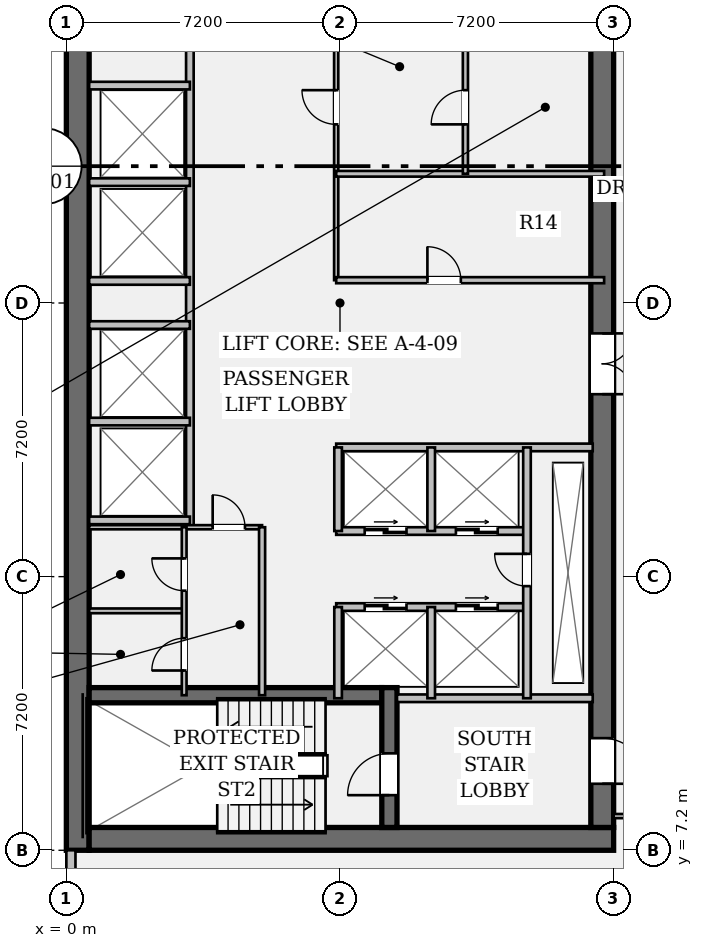
"""IFC4 building model, lengths in metres.
Left out: names, types, materials, properties, quantities, classifications, styles, units other than length and angle.
Written with IfcOpenShell. Run it as: python <this file> out.ifc"""

import sys

from ifc_helpers import new_model, si_unit, direction, frame, frame_2d, origin, place, context, subcontext, project, spatial, rectangle, extrude, element, fill, save


model = new_model("IFC4")
c1 = context("Model", 3, precision=1e-05, world=origin(), true_north=direction((0.0, 1.0)))
c2 = subcontext(c1, "Body", "Model", "MODEL_VIEW")
j1 = project(units=[si_unit("LENGTHUNIT", "METRE"), si_unit("PLANEANGLEUNIT", "RADIAN")], contexts=[c1])
p1 = place(None, origin())
s1 = spatial("IfcSite", under=j1, at=p1, CompositionType="ELEMENT")
p2 = place(p1, origin())
s2 = spatial("IfcBuilding", under=s1, at=p2, CompositionType="ELEMENT")
p3 = place(p2, frame((0.0, 0.0, 136.85)))
s3 = spatial("IfcBuildingStorey", under=s2, at=p3, CompositionType="ELEMENT", Elevation=136.85)
p4 = place(p3, frame((0.3, 7.2, 0.0), z_axis=(0.0, 0.0, 1.0), x_axis=(0.0, 1.0, 0.0)))
e1 = element("IfcWall", 1, at=p4, inside=s3, PredefinedType="SHEAR", context=c2, shape_type="SweptSolid", body=[
    extrude(rectangle(XDim=28.8, YDim=0.6, at=frame_2d((14.4, 0.0))), origin(), (0.0, 0.0, 1.0), 3.58),
])
p5 = place(p3, frame((0.6, 7.5, 0.0), z_axis=(0.0, 0.0, 1.0), x_axis=(1.0, 0.0, 0.0)))
e2 = element("IfcWall", 2, at=p5, inside=s3, PredefinedType="SHEAR", context=c2, shape_type="SweptSolid", body=[
    extrude(rectangle(XDim=13.8, YDim=0.6, at=frame_2d((6.9, 0.0))), origin(), (0.0, 0.0, 1.0), 3.58),
])
p6 = place(p3, frame((14.1, 35.4, 0.0), z_axis=(0.0, 0.0, 1.0), x_axis=(0.0, -1.0, 0.0)))
e3 = element("IfcWall", 3, at=p6, inside=s3, PredefinedType="SHEAR", context=c2, shape_type="SweptSolid", body=[
    extrude(rectangle(XDim=27.6, YDim=0.6, at=frame_2d((13.8, 0.0))), origin(), (0.0, 0.0, 1.0), 3.58),
])
p7 = place(p6, frame((1.3, 0.0, 0.0)))
e4 = element("IfcOpeningElement", 4, at=p7, cuts=e3, PredefinedType="OPENING", context=c2, shape_type="SweptSolid", body=[
    extrude(rectangle(XDim=1.2, YDim=2.15, at=frame_2d((0.6, 1.075))), frame((0.0, 0.312, 0.0), z_axis=(0.0, -1.0, 0.0), x_axis=(1.0, 0.0, 0.0)), (0.0, 0.0, 1.0), 0.624),
])
p8 = place(p6, frame((25.25, 0.0, 0.0)))
e5 = element("IfcOpeningElement", 5, at=p8, cuts=e3, PredefinedType="OPENING", context=c2, shape_type="SweptSolid", body=[
    extrude(rectangle(XDim=1.2, YDim=2.15, at=frame_2d((0.6, 1.075))), frame((0.0, 0.312, 0.0), z_axis=(0.0, -1.0, 0.0), x_axis=(1.0, 0.0, 0.0)), (0.0, 0.0, 1.0), 0.624),
])
p9 = place(p6, frame((14.6, 0.0, 0.0)))
e6 = element("IfcOpeningElement", 6, at=p9, cuts=e3, PredefinedType="OPENING", context=c2, shape_type="SweptSolid", body=[
    extrude(rectangle(XDim=1.6, YDim=2.2, at=frame_2d((0.8, 1.1))), frame((0.0, 0.312, 0.0), z_axis=(0.0, -1.0, 0.0), x_axis=(1.0, 0.0, 0.0)), (0.0, 0.0, 1.0), 0.624),
])
p10 = place(p3, frame((0.6, 11.28, 0.0), z_axis=(0.0, 0.0, 1.0), x_axis=(1.0, 0.0, 0.0)))
e7 = element("IfcWall", 7, at=p10, inside=s3, PredefinedType="SHEAR", context=c2, shape_type="SweptSolid", body=[
    extrude(rectangle(XDim=7.7, YDim=0.4, at=frame_2d((3.85, 0.0))), origin(), (0.0, 0.0, 1.0), 3.58),
])
p11 = place(p3, frame((8.5, 7.8, 0.0), z_axis=(0.0, 0.0, 1.0), x_axis=(0.0, 1.0, 0.0)))
e8 = element("IfcWall", 8, at=p11, inside=s3, PredefinedType="SHEAR", context=c2, shape_type="SweptSolid", body=[
    extrude(rectangle(XDim=3.68, YDim=0.4, at=frame_2d((1.84, 0.0))), origin(), (0.0, 0.0, 1.0), 3.58),
])
p12 = place(p11, frame((0.85, 0.0, 0.0)))
e9 = element("IfcOpeningElement", 9, at=p12, cuts=e8, PredefinedType="OPENING", context=c2, shape_type="SweptSolid", body=[
    extrude(rectangle(XDim=1.1, YDim=2.15, at=frame_2d((0.55, 1.075))), frame((0.0, 0.212, 0.0), z_axis=(0.0, -1.0, 0.0), x_axis=(1.0, 0.0, 0.0)), (0.0, 0.0, 1.0), 0.424),
])
p13 = place(p3, frame((0.12, 5.87, 0.0), z_axis=(0.0, 0.0, 1.0), x_axis=(0.0, 1.0, 0.0)))
e10 = element("IfcWall", 10, at=p13, inside=s3, PredefinedType="STANDARD", context=c2, shape_type="SweptSolid", body=[
    extrude(rectangle(XDim=1.33, YDim=0.24, at=frame_2d((0.665, 0.0))), origin(), (0.0, 0.0, 1.0), 3.58),
])
p14 = place(p3, frame((8.7, 11.2, 0.0), z_axis=(0.0, 0.0, 1.0), x_axis=(1.0, 0.0, 0.0)))
e11 = element("IfcWall", 11, at=p14, inside=s3, PredefinedType="PARTITIONING", context=c2, shape_type="SweptSolid", body=[
    extrude(rectangle(XDim=5.15, YDim=0.2, at=frame_2d((2.575, 0.0))), origin(), (0.0, 0.0, 1.0), 3.58),
])
p15 = place(p3, frame((3.25, 15.7, 0.0), z_axis=(0.0, 0.0, 1.0), x_axis=(0.0, 1.0, 0.0)))
e12 = element("IfcWall", 12, at=p15, inside=s3, PredefinedType="PARTITIONING", context=c2, shape_type="SweptSolid", body=[
    extrude(rectangle(XDim=13.08, YDim=0.2, at=frame_2d((6.54, 0.0))), origin(), (0.0, 0.0, 1.0), 3.58),
])
for number, where, z_axis, x_axis in (
    (13, (0.6, 15.88, 0.0), (0.0, 0.0, 1.0), (1.0, 0.0, 0.0)),
    (14, (0.6, 18.48, 0.0), (0.0, 0.0, 1.0), (1.0, 0.0, 0.0)),
    (15, (0.6, 22.18, 0.0), (0.0, 0.0, 1.0), (1.0, 0.0, 0.0)),
    (16, (0.6, 24.78, 0.0), (0.0, 0.0, 1.0), (1.0, 0.0, 0.0)),
    (17, (0.6, 21.02, 0.0), (0.0, 0.0, 1.0), (1.0, 0.0, 0.0)),
    (18, (0.6, 27.32, 0.0), (0.0, 0.0, 1.0), (1.0, 0.0, 0.0)),
):
    element("IfcWall", number, at=place(p3, frame(where, z_axis=z_axis, x_axis=x_axis)), inside=s3, PredefinedType="PARTITIONING", context=c2, shape_type="SweptSolid", body=[
        extrude(rectangle(XDim=2.65, YDim=0.2, at=frame_2d((1.325, 0.0))), origin(), (0.0, 0.0, 1.0), 3.58),
    ])
p16 = place(p3, frame((7.1, 22.2, 0.0), z_axis=(0.0, 0.0, 1.0), x_axis=(0.0, 1.0, 0.0)))
e19 = element("IfcWall", 19, at=p16, inside=s3, PredefinedType="PARTITIONING", context=c2, shape_type="SweptSolid", body=[
    extrude(rectangle(XDim=6.58, YDim=0.11, at=frame_2d((3.29, 0.0))), origin(), (0.0, 0.0, 1.0), 3.58),
])
p17 = place(p16, frame((4.1, 0.0, 0.0)))
e20 = element("IfcOpeningElement", 20, at=p17, cuts=e19, PredefinedType="OPENING", context=c2, shape_type="SweptSolid", body=[
    extrude(rectangle(XDim=0.9, YDim=2.15, at=frame_2d((0.45, 1.075))), frame((0.0, 0.067, 0.0), z_axis=(0.0, -1.0, 0.0), x_axis=(1.0, 0.0, 0.0)), (0.0, 0.0, 1.0), 0.134),
])
p18 = place(p3, frame((7.1, 22.2, 0.0), z_axis=(0.0, 0.0, 1.0), x_axis=(1.0, 0.0, 0.0)))
e21 = element("IfcWall", 21, at=p18, inside=s3, PredefinedType="PARTITIONING", context=c2, shape_type="SweptSolid", body=[
    extrude(rectangle(XDim=7.05, YDim=0.16, at=frame_2d((3.525, 0.0))), origin(), (0.0, 0.0, 1.0), 3.58),
])
p19 = place(p18, frame((2.4, 0.0, 0.0)))
e22 = element("IfcOpeningElement", 22, at=p19, cuts=e21, PredefinedType="OPENING", context=c2, shape_type="SweptSolid", body=[
    extrude(rectangle(XDim=0.88, YDim=2.15, at=frame_2d((0.44, 1.075))), frame((0.0, 0.092, 0.0), z_axis=(0.0, -1.0, 0.0), x_axis=(1.0, 0.0, 0.0)), (0.0, 0.0, 1.0), 0.184),
])
p20 = place(p3, frame((7.1, 25.0, 0.0), z_axis=(0.0, 0.0, 1.0), x_axis=(1.0, 0.0, 0.0)))
e23 = element("IfcWall", 23, at=p20, inside=s3, PredefinedType="PARTITIONING", context=c2, shape_type="SweptSolid", body=[
    extrude(rectangle(XDim=7.05, YDim=0.15, at=frame_2d((3.525, 0.0))), origin(), (0.0, 0.0, 1.0), 3.58),
])
p21 = place(p3, frame((10.5, 25.0, 0.0), z_axis=(0.0, 0.0, 1.0), x_axis=(0.0, 1.0, 0.0)))
e24 = element("IfcWall", 24, at=p21, inside=s3, PredefinedType="PARTITIONING", context=c2, shape_type="SweptSolid", body=[
    extrude(rectangle(XDim=3.78, YDim=0.135, at=frame_2d((1.89, 0.0))), origin(), (0.0, 0.0, 1.0), 3.58),
])
p22 = place(p21, frame((1.3, 0.0, 0.0)))
e25 = element("IfcOpeningElement", 25, at=p22, cuts=e24, PredefinedType="OPENING", context=c2, shape_type="SweptSolid", body=[
    extrude(rectangle(XDim=0.9, YDim=2.15, at=frame_2d((0.45, 1.075))), frame((0.0, 0.08, 0.0), z_axis=(0.0, -1.0, 0.0), x_axis=(1.0, 0.0, 0.0)), (0.0, 0.0, 1.0), 0.159),
])
p23 = place(p3, frame((7.1, 17.8, 0.0), z_axis=(0.0, 0.0, 1.0), x_axis=(1.0, 0.0, 0.0)))
e26 = element("IfcWall", 26, at=p23, inside=s3, PredefinedType="PARTITIONING", context=c2, shape_type="SweptSolid", body=[
    extrude(rectangle(XDim=6.75, YDim=0.2, at=frame_2d((3.375, 0.0))), origin(), (0.0, 0.0, 1.0), 3.58),
])
p24 = place(p3, frame((7.1, 15.6, 0.0), z_axis=(0.0, 0.0, 1.0), x_axis=(1.0, 0.0, 0.0)))
e27 = element("IfcWall", 27, at=p24, inside=s3, PredefinedType="PARTITIONING", context=c2, shape_type="SweptSolid", body=[
    extrude(rectangle(XDim=5.02, YDim=0.2, at=frame_2d((2.51, 0.0))), origin(), (0.0, 0.0, 1.0), 3.58),
])
p25 = place(p24, frame((0.75, 0.0, 0.0)))
e28 = element("IfcOpeningElement", 28, at=p25, cuts=e27, PredefinedType="OPENING", context=c2, shape_type="SweptSolid", body=[
    extrude(rectangle(XDim=1.1, YDim=2.2, at=frame_2d((0.55, 1.1))), frame((0.0, 0.112, 0.0), z_axis=(0.0, -1.0, 0.0), x_axis=(1.0, 0.0, 0.0)), (0.0, 0.0, 1.0), 0.224),
])
p26 = place(p24, frame((3.15, 0.0, 0.0)))
e29 = element("IfcOpeningElement", 29, at=p26, cuts=e27, PredefinedType="OPENING", context=c2, shape_type="SweptSolid", body=[
    extrude(rectangle(XDim=1.1, YDim=2.2, at=frame_2d((0.55, 1.1))), frame((0.0, 0.112, 0.0), z_axis=(0.0, -1.0, 0.0), x_axis=(1.0, 0.0, 0.0)), (0.0, 0.0, 1.0), 0.224),
])
p27 = place(p3, frame((7.1, 13.6, 0.0), z_axis=(0.0, 0.0, 1.0), x_axis=(1.0, 0.0, 0.0)))
e30 = element("IfcWall", 30, at=p27, inside=s3, PredefinedType="PARTITIONING", context=c2, shape_type="SweptSolid", body=[
    extrude(rectangle(XDim=5.02, YDim=0.2, at=frame_2d((2.51, 0.0))), origin(), (0.0, 0.0, 1.0), 3.58),
])
p28 = place(p27, frame((0.75, 0.0, 0.0)))
e31 = element("IfcOpeningElement", 31, at=p28, cuts=e30, PredefinedType="OPENING", context=c2, shape_type="SweptSolid", body=[
    extrude(rectangle(XDim=1.1, YDim=2.2, at=frame_2d((0.55, 1.1))), frame((0.0, 0.112, 0.0), z_axis=(0.0, -1.0, 0.0), x_axis=(1.0, 0.0, 0.0)), (0.0, 0.0, 1.0), 0.224),
])
p29 = place(p27, frame((3.15, 0.0, 0.0)))
e32 = element("IfcOpeningElement", 32, at=p29, cuts=e30, PredefinedType="OPENING", context=c2, shape_type="SweptSolid", body=[
    extrude(rectangle(XDim=1.1, YDim=2.2, at=frame_2d((0.55, 1.1))), frame((0.0, 0.112, 0.0), z_axis=(0.0, -1.0, 0.0), x_axis=(1.0, 0.0, 0.0)), (0.0, 0.0, 1.0), 0.224),
])
p30 = place(p3, frame((7.15, 15.6, 0.0), z_axis=(0.0, 0.0, 1.0), x_axis=(0.0, 1.0, 0.0)))
e33 = element("IfcWall", 33, at=p30, inside=s3, PredefinedType="PARTITIONING", context=c2, shape_type="SweptSolid", body=[
    extrude(rectangle(XDim=2.2, YDim=0.2, at=frame_2d((1.1, 0.0))), origin(), (0.0, 0.0, 1.0), 3.58),
])
p31 = place(p3, frame((7.15, 11.2, 0.0), z_axis=(0.0, 0.0, 1.0), x_axis=(0.0, 1.0, 0.0)))
e34 = element("IfcWall", 34, at=p31, inside=s3, PredefinedType="PARTITIONING", context=c2, shape_type="SweptSolid", body=[
    extrude(rectangle(XDim=2.4, YDim=0.2, at=frame_2d((1.2, 0.0))), origin(), (0.0, 0.0, 1.0), 3.58),
])
p32 = place(p3, frame((9.6, 15.6, 0.0), z_axis=(0.0, 0.0, 1.0), x_axis=(0.0, 1.0, 0.0)))
e35 = element("IfcWall", 35, at=p32, inside=s3, PredefinedType="PARTITIONING", context=c2, shape_type="SweptSolid", body=[
    extrude(rectangle(XDim=2.2, YDim=0.2, at=frame_2d((1.1, 0.0))), origin(), (0.0, 0.0, 1.0), 3.58),
])
p33 = place(p3, frame((9.6, 11.2, 0.0), z_axis=(0.0, 0.0, 1.0), x_axis=(0.0, 1.0, 0.0)))
e36 = element("IfcWall", 36, at=p33, inside=s3, PredefinedType="PARTITIONING", context=c2, shape_type="SweptSolid", body=[
    extrude(rectangle(XDim=2.4, YDim=0.2, at=frame_2d((1.2, 0.0))), origin(), (0.0, 0.0, 1.0), 3.58),
])
p34 = place(p3, frame((12.12, 11.2, 0.0), z_axis=(0.0, 0.0, 1.0), x_axis=(0.0, 1.0, 0.0)))
e37 = element("IfcWall", 37, at=p34, inside=s3, PredefinedType="PARTITIONING", context=c2, shape_type="SweptSolid", body=[
    extrude(rectangle(XDim=6.6, YDim=0.2, at=frame_2d((3.3, 0.0))), origin(), (0.0, 0.0, 1.0), 3.58),
])
p35 = place(p34, frame((2.95, 0.0, 0.0)))
e38 = element("IfcOpeningElement", 38, at=p35, cuts=e37, PredefinedType="OPENING", context=c2, shape_type="SweptSolid", body=[
    extrude(rectangle(XDim=0.85, YDim=2.15, at=frame_2d((0.425, 1.075))), frame((0.0, 0.112, 0.0), z_axis=(0.0, -1.0, 0.0), x_axis=(1.0, 0.0, 0.0)), (0.0, 0.0, 1.0), 0.224),
])
p36 = place(p3, frame((0.6, 15.7, 0.0), z_axis=(0.0, 0.0, 1.0), x_axis=(1.0, 0.0, 0.0)))
e39 = element("IfcWall", 39, at=p36, inside=s3, PredefinedType="PARTITIONING", context=c2, shape_type="SweptSolid", body=[
    extrude(rectangle(XDim=4.55, YDim=0.11, at=frame_2d((2.275, 0.0))), origin(), (0.0, 0.0, 1.0), 3.58),
])
p37 = place(p36, frame((3.25, 0.0, 0.0)))
e40 = element("IfcOpeningElement", 40, at=p37, cuts=e39, PredefinedType="OPENING", context=c2, shape_type="SweptSolid", body=[
    extrude(rectangle(XDim=0.85, YDim=2.15, at=frame_2d((0.425, 1.075))), frame((0.0, 0.067, 0.0), z_axis=(0.0, -1.0, 0.0), x_axis=(1.0, 0.0, 0.0)), (0.0, 0.0, 1.0), 0.134),
])
p38 = place(p3, frame((5.15, 11.28, 0.0), z_axis=(0.0, 0.0, 1.0), x_axis=(0.0, 1.0, 0.0)))
e41 = element("IfcWall", 41, at=p38, inside=s3, PredefinedType="PARTITIONING", context=c2, shape_type="SweptSolid", body=[
    extrude(rectangle(XDim=4.42, YDim=0.16, at=frame_2d((2.21, 0.0))), origin(), (0.0, 0.0, 1.0), 3.58),
])
p39 = place(p3, frame((0.6, 13.5, 0.0), z_axis=(0.0, 0.0, 1.0), x_axis=(1.0, 0.0, 0.0)))
e42 = element("IfcWall", 42, at=p39, inside=s3, PredefinedType="PARTITIONING", context=c2, shape_type="SweptSolid", body=[
    extrude(rectangle(XDim=2.5, YDim=0.125, at=frame_2d((1.25, 0.0))), origin(), (0.0, 0.0, 1.0), 3.58),
])
p40 = place(p3, frame((3.1, 11.28, 0.0), z_axis=(0.0, 0.0, 1.0), x_axis=(0.0, 1.0, 0.0)))
e43 = element("IfcWall", 43, at=p40, inside=s3, PredefinedType="PARTITIONING", context=c2, shape_type="SweptSolid", body=[
    extrude(rectangle(XDim=4.42, YDim=0.125, at=frame_2d((2.21, 0.0))), origin(), (0.0, 0.0, 1.0), 3.58),
])
p41 = place(p40, frame((0.65, 0.0, 0.0)))
e44 = element("IfcOpeningElement", 44, at=p41, cuts=e43, PredefinedType="OPENING", context=c2, shape_type="SweptSolid", body=[
    extrude(rectangle(XDim=0.85, YDim=2.15, at=frame_2d((0.425, 1.075))), frame((0.0, 0.074, 0.0), z_axis=(0.0, -1.0, 0.0), x_axis=(1.0, 0.0, 0.0)), (0.0, 0.0, 1.0), 0.149),
])
p42 = place(p40, frame((2.75, 0.0, 0.0)))
e45 = element("IfcOpeningElement", 45, at=p42, cuts=e43, PredefinedType="OPENING", context=c2, shape_type="SweptSolid", body=[
    extrude(rectangle(XDim=0.85, YDim=2.15, at=frame_2d((0.425, 1.075))), frame((0.0, 0.074, 0.0), z_axis=(0.0, -1.0, 0.0), x_axis=(1.0, 0.0, 0.0)), (0.0, 0.0, 1.0), 0.149),
])
p43 = place(p3, frame((14.4, 8.1, 0.0), z_axis=(0.0, 0.0, 1.0), x_axis=(1.0, 0.0, 0.0)))
e46 = element("IfcWall", 46, at=p43, inside=s3, PredefinedType="PARTITIONING", context=c2, shape_type="SweptSolid", body=[
    extrude(rectangle(XDim=2.95, YDim=0.11, at=frame_2d((1.475, 0.0))), origin(), (0.0, 0.0, 1.0), 3.148),
])
p44 = place(p43, frame((0.95, 0.0, 0.0)))
e47 = element("IfcOpeningElement", 47, at=p44, cuts=e46, PredefinedType="OPENING", context=c2, shape_type="SweptSolid", body=[
    extrude(rectangle(XDim=0.88, YDim=2.15, at=frame_2d((0.44, 1.075))), frame((0.0, 0.067, 0.0), z_axis=(0.0, -1.0, 0.0), x_axis=(1.0, 0.0, 0.0)), (0.0, 0.0, 1.0), 0.134),
])
p45 = place(p12, origin())
e48 = element("IfcDoor", 48, at=p45, inside=s3, OperationType="SINGLE_SWING_LEFT", PredefinedType="DOOR", context=c2, shape_type="SweptSolid", body=[
    extrude(rectangle(XDim=1.1, YDim=2.15, at=frame_2d((0.55, 1.075))), frame((0.0, 0.025, 0.0), z_axis=(0.0, -1.0, 0.0), x_axis=(1.0, 0.0, 0.0)), (0.0, 0.0, 1.0), 0.05),
])
fill(e9, e48)
p46 = place(p8, origin())
e49 = element("IfcDoor", 49, at=p46, inside=s3, OperationType="SINGLE_SWING_RIGHT", PredefinedType="DOOR", context=c2, shape_type="SweptSolid", body=[
    extrude(rectangle(XDim=1.2, YDim=2.15, at=frame_2d((0.6, 1.075))), frame((0.0, 0.025, 0.0), z_axis=(0.0, -1.0, 0.0), x_axis=(1.0, 0.0, 0.0)), (0.0, 0.0, 1.0), 0.05),
])
fill(e5, e49)
p47 = place(p9, origin())
e50 = element("IfcDoor", 50, at=p47, inside=s3, OperationType="DOUBLE_DOOR_SINGLE_SWING", PredefinedType="DOOR", context=c2, shape_type="SweptSolid", body=[
    extrude(rectangle(XDim=1.6, YDim=2.2, at=frame_2d((0.8, 1.1))), frame((0.0, 0.025, 0.0), z_axis=(0.0, -1.0, 0.0), x_axis=(1.0, 0.0, 0.0)), (0.0, 0.0, 1.0), 0.05),
])
fill(e6, e50)
p48 = place(p19, origin())
e51 = element("IfcDoor", 51, at=p48, inside=s3, OperationType="SINGLE_SWING_LEFT", PredefinedType="DOOR", context=c2, shape_type="SweptSolid", body=[
    extrude(rectangle(XDim=0.88, YDim=2.15, at=frame_2d((0.44, 1.075))), frame((0.0, 0.025, 0.0), z_axis=(0.0, -1.0, 0.0), x_axis=(1.0, 0.0, 0.0)), (0.0, 0.0, 1.0), 0.05),
])
fill(e22, e51)
p49 = place(p17, origin())
e52 = element("IfcDoor", 52, at=p49, inside=s3, OperationType="SINGLE_SWING_RIGHT", PredefinedType="DOOR", context=c2, shape_type="SweptSolid", body=[
    extrude(rectangle(XDim=0.9, YDim=2.15, at=frame_2d((0.45, 1.075))), frame((0.0, 0.025, 0.0), z_axis=(0.0, -1.0, 0.0), x_axis=(1.0, 0.0, 0.0)), (0.0, 0.0, 1.0), 0.05),
])
fill(e20, e52)
p50 = place(p22, origin())
e53 = element("IfcDoor", 53, at=p50, inside=s3, OperationType="SINGLE_SWING_LEFT", PredefinedType="DOOR", context=c2, shape_type="SweptSolid", body=[
    extrude(rectangle(XDim=0.9, YDim=2.15, at=frame_2d((0.45, 1.075))), frame((0.0, 0.025, 0.0), z_axis=(0.0, -1.0, 0.0), x_axis=(1.0, 0.0, 0.0)), (0.0, 0.0, 1.0), 0.05),
])
fill(e25, e53)
p51 = place(p35, origin())
e54 = element("IfcDoor", 54, at=p51, inside=s3, OperationType="SINGLE_SWING_RIGHT", PredefinedType="DOOR", context=c2, shape_type="SweptSolid", body=[
    extrude(rectangle(XDim=0.85, YDim=2.15, at=frame_2d((0.425, 1.075))), frame((0.0, 0.025, 0.0), z_axis=(0.0, -1.0, 0.0), x_axis=(1.0, 0.0, 0.0)), (0.0, 0.0, 1.0), 0.05),
])
fill(e38, e54)
p52 = place(p25, origin())
e55 = element("IfcDoor", 55, at=p52, inside=s3, OperationType="DOUBLE_DOOR_SLIDING", PredefinedType="DOOR", context=c2, shape_type="SweptSolid", body=[
    extrude(rectangle(XDim=1.1, YDim=2.2, at=frame_2d((0.55, 1.1))), frame((0.0, 0.025, 0.0), z_axis=(0.0, -1.0, 0.0), x_axis=(1.0, 0.0, 0.0)), (0.0, 0.0, 1.0), 0.05),
])
fill(e28, e55)
p53 = place(p26, origin())
e56 = element("IfcDoor", 56, at=p53, inside=s3, OperationType="DOUBLE_DOOR_SLIDING", PredefinedType="DOOR", context=c2, shape_type="SweptSolid", body=[
    extrude(rectangle(XDim=1.1, YDim=2.2, at=frame_2d((0.55, 1.1))), frame((0.0, 0.025, 0.0), z_axis=(0.0, -1.0, 0.0), x_axis=(1.0, 0.0, 0.0)), (0.0, 0.0, 1.0), 0.05),
])
fill(e29, e56)
p54 = place(p28, origin())
e57 = element("IfcDoor", 57, at=p54, inside=s3, OperationType="DOUBLE_DOOR_SLIDING", PredefinedType="DOOR", context=c2, shape_type="SweptSolid", body=[
    extrude(rectangle(XDim=1.1, YDim=2.2, at=frame_2d((0.55, 1.1))), frame((0.0, 0.025, 0.0), z_axis=(0.0, -1.0, 0.0), x_axis=(1.0, 0.0, 0.0)), (0.0, 0.0, 1.0), 0.05),
])
fill(e31, e57)
p55 = place(p29, origin())
e58 = element("IfcDoor", 58, at=p55, inside=s3, OperationType="DOUBLE_DOOR_SLIDING", PredefinedType="DOOR", context=c2, shape_type="SweptSolid", body=[
    extrude(rectangle(XDim=1.1, YDim=2.2, at=frame_2d((0.55, 1.1))), frame((0.0, 0.025, 0.0), z_axis=(0.0, -1.0, 0.0), x_axis=(1.0, 0.0, 0.0)), (0.0, 0.0, 1.0), 0.05),
])
fill(e32, e58)
p56 = place(p37, origin())
e59 = element("IfcDoor", 59, at=p56, inside=s3, OperationType="SINGLE_SWING_LEFT", PredefinedType="DOOR", context=c2, shape_type="SweptSolid", body=[
    extrude(rectangle(XDim=0.85, YDim=2.15, at=frame_2d((0.425, 1.075))), frame((0.0, 0.025, 0.0), z_axis=(0.0, -1.0, 0.0), x_axis=(1.0, 0.0, 0.0)), (0.0, 0.0, 1.0), 0.05),
])
fill(e40, e59)
p57 = place(p41, origin())
e60 = element("IfcDoor", 60, at=p57, inside=s3, OperationType="SINGLE_SWING_LEFT", PredefinedType="DOOR", context=c2, shape_type="SweptSolid", body=[
    extrude(rectangle(XDim=0.85, YDim=2.15, at=frame_2d((0.425, 1.075))), frame((0.0, 0.025, 0.0), z_axis=(0.0, -1.0, 0.0), x_axis=(1.0, 0.0, 0.0)), (0.0, 0.0, 1.0), 0.05),
])
fill(e44, e60)
p58 = place(p42, origin())
e61 = element("IfcDoor", 61, at=p58, inside=s3, OperationType="SINGLE_SWING_RIGHT", PredefinedType="DOOR", context=c2, shape_type="SweptSolid", body=[
    extrude(rectangle(XDim=0.85, YDim=2.15, at=frame_2d((0.425, 1.075))), frame((0.0, 0.025, 0.0), z_axis=(0.0, -1.0, 0.0), x_axis=(1.0, 0.0, 0.0)), (0.0, 0.0, 1.0), 0.05),
])
fill(e45, e61)
save(model, sys.argv[1])
